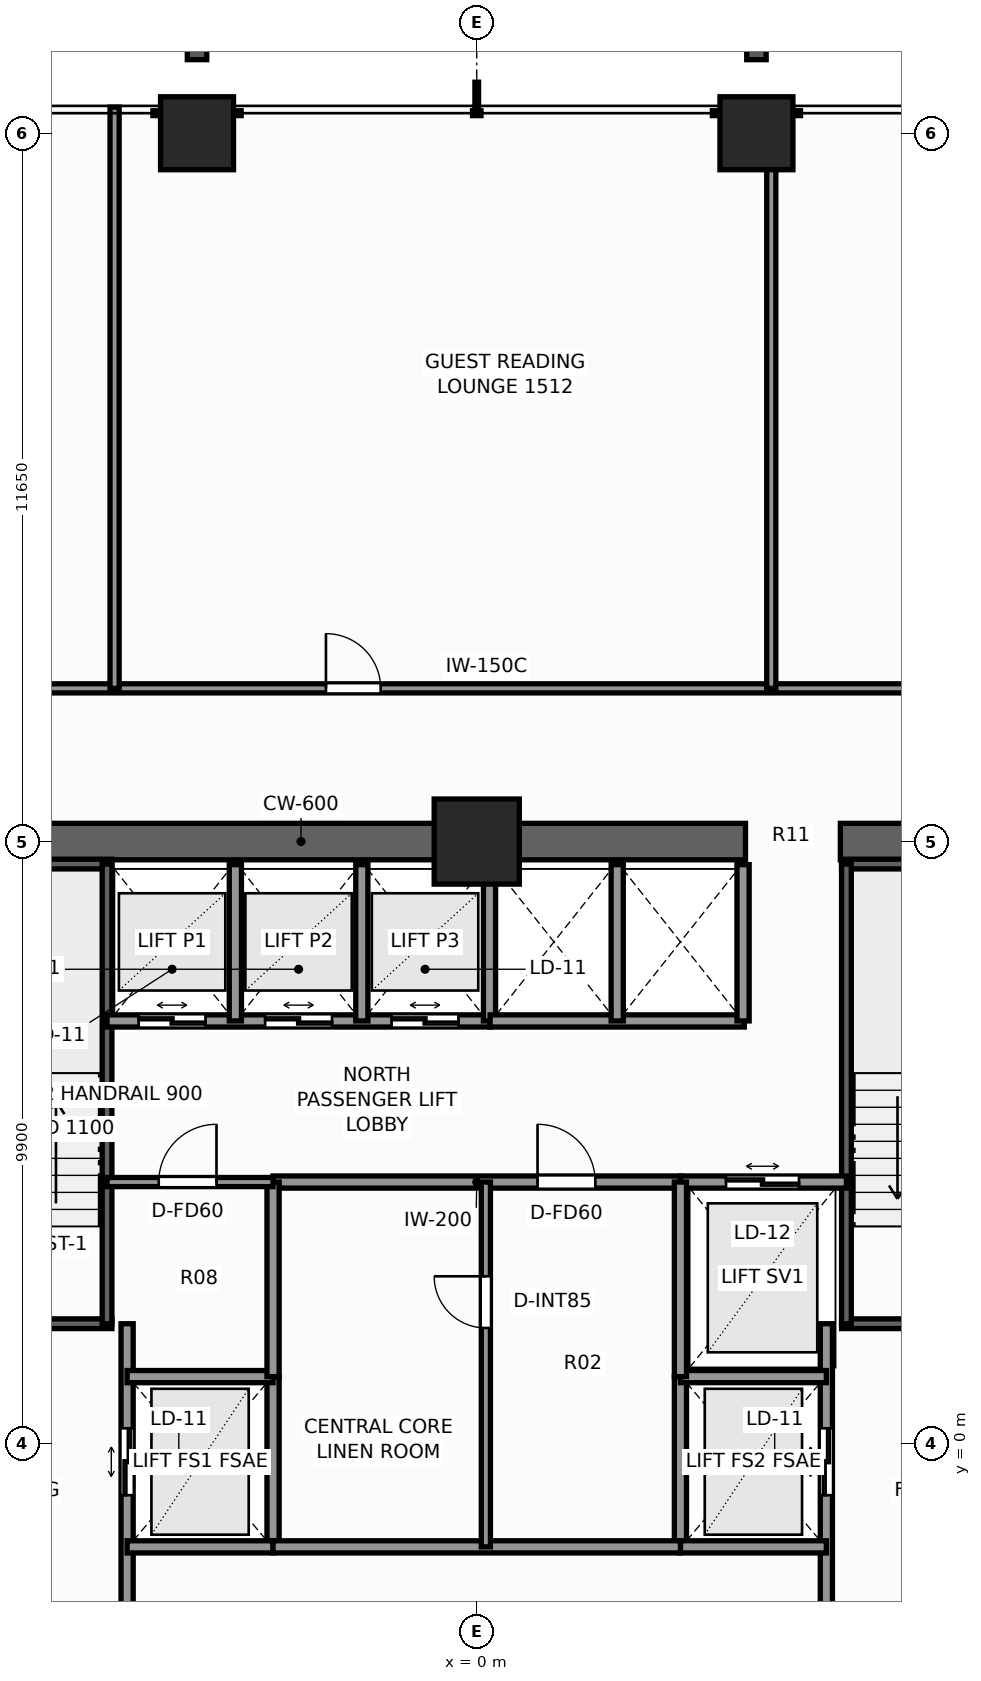
"""IFC4 building model, lengths in metres.
Left out: names, types, materials, properties, quantities, classifications, styles, units other than length and angle.
Written with IfcOpenShell. Run it as: python <this file> out.ifc"""

import sys

from ifc_helpers import new_model, si_unit, direction, frame, frame_2d, origin, origin_2d, place, context, subcontext, project, spatial, rectangle, extrude, element, fill, save


model = new_model("IFC4")
c1 = context("Model", 3, precision=1e-05, world=origin(), true_north=direction((0.0, 1.0)))
c2 = subcontext(c1, "Body", "Model", "MODEL_VIEW")
j1 = project(units=[si_unit("LENGTHUNIT", "METRE"), si_unit("PLANEANGLEUNIT", "RADIAN")], contexts=[c1])
p1 = place(None, origin())
s1 = spatial("IfcSite", under=j1, at=p1, CompositionType="ELEMENT")
p2 = place(p1, origin())
s2 = spatial("IfcBuilding", under=s1, at=p2, CompositionType="ELEMENT")
p3 = place(p2, frame((0.0, 0.0, 53.5)))
s3 = spatial("IfcBuildingStorey", under=s2, at=p3, CompositionType="ELEMENT", Elevation=53.5)
p4 = place(p3, frame((-10.2, 9.9, 0.0), z_axis=(0.0, 0.0, 1.0), x_axis=(1.0, 0.0, 0.0)))
e1 = element("IfcWall", 1, at=p4, inside=s3, PredefinedType="SHEAR", context=c2, shape_type="SweptSolid", body=[
    extrude(rectangle(XDim=14.62, YDim=0.6, at=frame_2d((7.31, 0.0))), origin(), (0.0, 0.0, 1.0), 3.3),
])
p5 = place(p3, frame((5.98, 9.9, 0.0), z_axis=(0.0, 0.0, 1.0), x_axis=(1.0, 0.0, 0.0)))
e2 = element("IfcWall", 2, at=p5, inside=s3, PredefinedType="SHEAR", context=c2, shape_type="SweptSolid", body=[
    extrude(rectangle(XDim=4.22, YDim=0.6, at=frame_2d((2.11, 0.0))), origin(), (0.0, 0.0, 1.0), 3.3),
])
p6 = place(p3, frame((0.0, 9.9, 0.0), z_axis=(0.0, 0.0, 1.0), x_axis=(1.0, 0.0, 0.0)))
e3 = element("IfcColumn", 3, at=p6, inside=s3, PredefinedType="COLUMN", context=c2, shape_type="SweptSolid", body=[
    extrude(rectangle(XDim=1.4, YDim=1.4, at=origin_2d()), origin(), (0.0, 0.0, 1.0), 3.3),
])
for number, where, z_axis, x_axis in (
    (4, (-4.6, 21.55, 0.0), (0.0, 0.0, 1.0), (1.0, 0.0, 0.0)),
    (5, (4.6, 21.55, 0.0), (0.0, 0.0, 1.0), (1.0, 0.0, 0.0)),
):
    element("IfcColumn", number, at=place(p3, frame(where, z_axis=z_axis, x_axis=x_axis)), inside=s3, PredefinedType="COLUMN", context=c2, shape_type="SweptSolid", body=[
        extrude(rectangle(XDim=1.2, YDim=1.2, at=origin_2d()), origin(), (0.0, 0.0, 1.0), 3.3),
    ])
p7 = place(p3, frame((-9.52, 1.97, 0.0), z_axis=(0.0, 0.0, 1.0), x_axis=(1.0, 0.0, 0.0)))
e6 = element("IfcWall", 6, at=p7, inside=s3, PredefinedType="SHEAR", context=c2, shape_type="SweptSolid", body=[
    extrude(rectangle(XDim=3.52, YDim=0.16, at=frame_2d((1.76, 0.0))), origin(), (0.0, 0.0, 1.0), 3.3),
])
p8 = place(p7, frame((1.15, 0.0, 0.0)))
e7 = element("IfcOpeningElement", 7, at=p8, cuts=e6, PredefinedType="OPENING", context=c2, shape_type="SweptSolid", body=[
    extrude(rectangle(XDim=1.1, YDim=2.2, at=frame_2d((0.55, 1.1))), frame((0.0, 0.09, 0.0), z_axis=(0.0, -1.0, 0.0), x_axis=(1.0, 0.0, 0.0)), (0.0, 0.0, 1.0), 0.18),
])
p9 = place(p3, frame((-9.52, 9.53, 0.0), z_axis=(0.0, 0.0, 1.0), x_axis=(1.0, 0.0, 0.0)))
e8 = element("IfcWall", 8, at=p9, inside=s3, PredefinedType="SHEAR", context=c2, shape_type="SweptSolid", body=[
    extrude(rectangle(XDim=3.52, YDim=0.16, at=frame_2d((1.76, 0.0))), origin(), (0.0, 0.0, 1.0), 3.3),
])
p10 = place(p3, frame((-6.08, 1.97, 0.0), z_axis=(0.0, 0.0, 1.0), x_axis=(0.0, 1.0, 0.0)))
e9 = element("IfcWall", 9, at=p10, inside=s3, PredefinedType="SHEAR", context=c2, shape_type="SweptSolid", body=[
    extrude(rectangle(XDim=7.56, YDim=0.16, at=frame_2d((3.78, 0.0))), origin(), (0.0, 0.0, 1.0), 3.3),
])
p11 = place(p3, frame((6.0, 1.97, 0.0), z_axis=(0.0, 0.0, 1.0), x_axis=(1.0, 0.0, 0.0)))
e10 = element("IfcWall", 10, at=p11, inside=s3, PredefinedType="SHEAR", context=c2, shape_type="SweptSolid", body=[
    extrude(rectangle(XDim=3.52, YDim=0.16, at=frame_2d((1.76, 0.0))), origin(), (0.0, 0.0, 1.0), 3.3),
])
p12 = place(p11, frame((1.15, 0.0, 0.0)))
e11 = element("IfcOpeningElement", 11, at=p12, cuts=e10, PredefinedType="OPENING", context=c2, shape_type="SweptSolid", body=[
    extrude(rectangle(XDim=1.1, YDim=2.2, at=frame_2d((0.55, 1.1))), frame((0.0, 0.09, 0.0), z_axis=(0.0, -1.0, 0.0), x_axis=(1.0, 0.0, 0.0)), (0.0, 0.0, 1.0), 0.18),
])
p13 = place(p3, frame((6.0, 9.53, 0.0), z_axis=(0.0, 0.0, 1.0), x_axis=(1.0, 0.0, 0.0)))
e12 = element("IfcWall", 12, at=p13, inside=s3, PredefinedType="SHEAR", context=c2, shape_type="SweptSolid", body=[
    extrude(rectangle(XDim=3.52, YDim=0.16, at=frame_2d((1.76, 0.0))), origin(), (0.0, 0.0, 1.0), 3.3),
])
p14 = place(p3, frame((6.08, 1.97, 0.0), z_axis=(0.0, 0.0, 1.0), x_axis=(0.0, 1.0, 0.0)))
e13 = element("IfcWall", 13, at=p14, inside=s3, PredefinedType="SHEAR", context=c2, shape_type="SweptSolid", body=[
    extrude(rectangle(XDim=7.56, YDim=0.16, at=frame_2d((3.78, 0.0))), origin(), (0.0, 0.0, 1.0), 3.3),
])
p15 = place(p3, frame((-5.75, -3.6, 0.0), z_axis=(0.0, 0.0, 1.0), x_axis=(0.0, 1.0, 0.0)))
e14 = element("IfcWall", 14, at=p15, inside=s3, PredefinedType="SOLIDWALL", context=c2, shape_type="SweptSolid", body=[
    extrude(rectangle(XDim=5.57, YDim=0.2, at=frame_2d((2.785, 0.0))), origin(), (0.0, 0.0, 1.0), 3.06),
])
p16 = place(p15, frame((2.75, 0.0, 0.0)))
e15 = element("IfcOpeningElement", 15, at=p16, cuts=e14, PredefinedType="OPENING", context=c2, shape_type="SweptSolid", body=[
    extrude(rectangle(XDim=1.1, YDim=2.2, at=frame_2d((0.55, 1.1))), frame((0.0, 0.11, 0.0), z_axis=(0.0, -1.0, 0.0), x_axis=(1.0, 0.0, 0.0)), (0.0, 0.0, 1.0), 0.22),
])
p17 = place(p3, frame((-3.35, -1.7, 0.0), z_axis=(0.0, 0.0, 1.0), x_axis=(0.0, 1.0, 0.0)))
e16 = element("IfcWall", 16, at=p17, inside=s3, PredefinedType="SOLIDWALL", context=c2, shape_type="SweptSolid", body=[
    extrude(rectangle(XDim=2.8, YDim=0.2, at=frame_2d((1.4, 0.0))), origin(), (0.0, 0.0, 1.0), 3.06),
])
for number, where, z_axis, x_axis in (
    (17, (-5.75, -1.7, 0.0), (0.0, 0.0, 1.0), (1.0, 0.0, 0.0)),
    (18, (-5.75, 1.1, 0.0), (0.0, 0.0, 1.0), (1.0, 0.0, 0.0)),
):
    element("IfcWall", number, at=place(p3, frame(where, z_axis=z_axis, x_axis=x_axis)), inside=s3, PredefinedType="SOLIDWALL", context=c2, shape_type="SweptSolid", body=[
        extrude(rectangle(XDim=2.4, YDim=0.2, at=frame_2d((1.2, 0.0))), origin(), (0.0, 0.0, 1.0), 3.06),
    ])
p18 = place(p3, frame((5.75, -3.6, 0.0), z_axis=(0.0, 0.0, 1.0), x_axis=(0.0, 1.0, 0.0)))
e19 = element("IfcWall", 19, at=p18, inside=s3, PredefinedType="SOLIDWALL", context=c2, shape_type="SweptSolid", body=[
    extrude(rectangle(XDim=5.57, YDim=0.2, at=frame_2d((2.785, 0.0))), origin(), (0.0, 0.0, 1.0), 3.06),
])
p19 = place(p18, frame((2.75, 0.0, 0.0)))
e20 = element("IfcOpeningElement", 20, at=p19, cuts=e19, PredefinedType="OPENING", context=c2, shape_type="SweptSolid", body=[
    extrude(rectangle(XDim=1.1, YDim=2.2, at=frame_2d((0.55, 1.1))), frame((0.0, 0.11, 0.0), z_axis=(0.0, -1.0, 0.0), x_axis=(1.0, 0.0, 0.0)), (0.0, 0.0, 1.0), 0.22),
])
p20 = place(p3, frame((3.35, -1.7, 0.0), z_axis=(0.0, 0.0, 1.0), x_axis=(0.0, 1.0, 0.0)))
e21 = element("IfcWall", 21, at=p20, inside=s3, PredefinedType="SOLIDWALL", context=c2, shape_type="SweptSolid", body=[
    extrude(rectangle(XDim=2.8, YDim=0.2, at=frame_2d((1.4, 0.0))), origin(), (0.0, 0.0, 1.0), 3.06),
])
for number, where, z_axis, x_axis in (
    (22, (3.35, -1.7, 0.0), (0.0, 0.0, 1.0), (1.0, 0.0, 0.0)),
    (23, (3.35, 1.1, 0.0), (0.0, 0.0, 1.0), (1.0, 0.0, 0.0)),
):
    element("IfcWall", number, at=place(p3, frame(where, z_axis=z_axis, x_axis=x_axis)), inside=s3, PredefinedType="SOLIDWALL", context=c2, shape_type="SweptSolid", body=[
        extrude(rectangle(XDim=2.4, YDim=0.2, at=frame_2d((1.2, 0.0))), origin(), (0.0, 0.0, 1.0), 3.06),
    ])
p21 = place(p3, frame((3.35, 4.3, 0.0), z_axis=(0.0, 0.0, 1.0), x_axis=(1.0, 0.0, 0.0)))
e24 = element("IfcWall", 24, at=p21, inside=s3, PredefinedType="SOLIDWALL", context=c2, shape_type="SweptSolid", body=[
    extrude(rectangle(XDim=2.73, YDim=0.2, at=frame_2d((1.365, 0.0))), origin(), (0.0, 0.0, 1.0), 3.06),
])
p22 = place(p21, frame((0.75, 0.0, 0.0)))
e25 = element("IfcOpeningElement", 25, at=p22, cuts=e24, PredefinedType="OPENING", context=c2, shape_type="SweptSolid", body=[
    extrude(rectangle(XDim=1.2, YDim=2.25, at=frame_2d((0.6, 1.125))), frame((0.0, 0.11, 0.0), z_axis=(0.0, -1.0, 0.0), x_axis=(1.0, 0.0, 0.0)), (0.0, 0.0, 1.0), 0.22),
])
p23 = place(p3, frame((-6.08, 6.95, 0.0), z_axis=(0.0, 0.0, 1.0), x_axis=(1.0, 0.0, 0.0)))
e26 = element("IfcWall", 26, at=p23, inside=s3, PredefinedType="SOLIDWALL", context=c2, shape_type="SweptSolid", body=[
    extrude(rectangle(XDim=6.3, YDim=0.2, at=frame_2d((3.15, 0.0))), origin(), (0.0, 0.0, 1.0), 3.06),
])
p24 = place(p23, frame((0.52, 0.0, 0.0)))
e27 = element("IfcOpeningElement", 27, at=p24, cuts=e26, PredefinedType="OPENING", context=c2, shape_type="SweptSolid", body=[
    extrude(rectangle(XDim=1.1, YDim=2.2, at=frame_2d((0.55, 1.1))), frame((0.0, 0.11, 0.0), z_axis=(0.0, -1.0, 0.0), x_axis=(1.0, 0.0, 0.0)), (0.0, 0.0, 1.0), 0.22),
])
p25 = place(p23, frame((2.6, 0.0, 0.0)))
e28 = element("IfcOpeningElement", 28, at=p25, cuts=e26, PredefinedType="OPENING", context=c2, shape_type="SweptSolid", body=[
    extrude(rectangle(XDim=1.1, YDim=2.2, at=frame_2d((0.55, 1.1))), frame((0.0, 0.11, 0.0), z_axis=(0.0, -1.0, 0.0), x_axis=(1.0, 0.0, 0.0)), (0.0, 0.0, 1.0), 0.22),
])
p26 = place(p23, frame((4.68, 0.0, 0.0)))
e29 = element("IfcOpeningElement", 29, at=p26, cuts=e26, PredefinedType="OPENING", context=c2, shape_type="SweptSolid", body=[
    extrude(rectangle(XDim=1.1, YDim=2.2, at=frame_2d((0.55, 1.1))), frame((0.0, 0.11, 0.0), z_axis=(0.0, -1.0, 0.0), x_axis=(1.0, 0.0, 0.0)), (0.0, 0.0, 1.0), 0.22),
])
for number, where, z_axis, x_axis in (
    (30, (-3.97, 6.95, 0.0), (0.0, 0.0, 1.0), (0.0, 1.0, 0.0)),
    (31, (-1.89, 6.95, 0.0), (0.0, 0.0, 1.0), (0.0, 1.0, 0.0)),
    (32, (0.21, 6.95, 0.0), (0.0, 0.0, 1.0), (0.0, 1.0, 0.0)),
):
    element("IfcWall", number, at=place(p3, frame(where, z_axis=z_axis, x_axis=x_axis)), inside=s3, PredefinedType="SOLIDWALL", context=c2, shape_type="SweptSolid", body=[
        extrude(rectangle(XDim=2.57, YDim=0.2, at=frame_2d((1.285, 0.0))), origin(), (0.0, 0.0, 1.0), 3.06),
    ])
p27 = place(p3, frame((0.22, 6.95, 0.0), z_axis=(0.0, 0.0, 1.0), x_axis=(1.0, 0.0, 0.0)))
e33 = element("IfcWall", 33, at=p27, inside=s3, PredefinedType="SOLIDWALL", context=c2, shape_type="SweptSolid", body=[
    extrude(rectangle(XDim=4.18, YDim=0.2, at=frame_2d((2.09, 0.0))), origin(), (0.0, 0.0, 1.0), 3.06),
])
for number, where, z_axis, x_axis in (
    (34, (4.38, 6.95, 0.0), (0.0, 0.0, 1.0), (0.0, 1.0, 0.0)),
    (35, (2.31, 6.95, 0.0), (0.0, 0.0, 1.0), (0.0, 1.0, 0.0)),
):
    element("IfcWall", number, at=place(p3, frame(where, z_axis=z_axis, x_axis=x_axis)), inside=s3, PredefinedType="SOLIDWALL", context=c2, shape_type="SweptSolid", body=[
        extrude(rectangle(XDim=2.57, YDim=0.2, at=frame_2d((1.285, 0.0))), origin(), (0.0, 0.0, 1.0), 3.06),
    ])
p28 = place(p3, frame((-3.35, 4.3, 0.0), z_axis=(0.0, 0.0, 1.0), x_axis=(1.0, 0.0, 0.0)))
e36 = element("IfcWall", 36, at=p28, inside=s3, PredefinedType="SOLIDWALL", context=c2, shape_type="SweptSolid", body=[
    extrude(rectangle(XDim=6.7, YDim=0.2, at=frame_2d((3.35, 0.0))), origin(), (0.0, 0.0, 1.0), 3.06),
])
p29 = place(p28, frame((4.35, 0.0, 0.0)))
e37 = element("IfcOpeningElement", 37, at=p29, cuts=e36, PredefinedType="OPENING", context=c2, shape_type="SweptSolid", body=[
    extrude(rectangle(XDim=0.95, YDim=2.06, at=frame_2d((0.475, 1.03))), frame((0.0, 0.11, 0.0), z_axis=(0.0, -1.0, 0.0), x_axis=(1.0, 0.0, 0.0)), (0.0, 0.0, 1.0), 0.22),
])
p30 = place(p3, frame((-3.35, -1.7, 0.0), z_axis=(0.0, 0.0, 1.0), x_axis=(1.0, 0.0, 0.0)))
e38 = element("IfcWall", 38, at=p30, inside=s3, PredefinedType="SOLIDWALL", context=c2, shape_type="SweptSolid", body=[
    extrude(rectangle(XDim=6.7, YDim=0.2, at=frame_2d((3.35, 0.0))), origin(), (0.0, 0.0, 1.0), 3.06),
])
for number, where, z_axis, x_axis in (
    (39, (-3.35, 1.1, 0.0), (0.0, 0.0, 1.0), (0.0, 1.0, 0.0)),
    (40, (3.35, 1.1, 0.0), (0.0, 0.0, 1.0), (0.0, 1.0, 0.0)),
):
    element("IfcWall", number, at=place(p3, frame(where, z_axis=z_axis, x_axis=x_axis)), inside=s3, PredefinedType="SOLIDWALL", context=c2, shape_type="SweptSolid", body=[
        extrude(rectangle(XDim=3.2, YDim=0.2, at=frame_2d((1.6, 0.0))), origin(), (0.0, 0.0, 1.0), 3.06),
    ])
p31 = place(p3, frame((0.15, -1.7, 0.0), z_axis=(0.0, 0.0, 1.0), x_axis=(0.0, 1.0, 0.0)))
e41 = element("IfcWall", 41, at=p31, inside=s3, PredefinedType="PARTITIONING", context=c2, shape_type="SweptSolid", body=[
    extrude(rectangle(XDim=6.0, YDim=0.15, at=frame_2d((3.0, 0.0))), origin(), (0.0, 0.0, 1.0), 3.06),
])
p32 = place(p31, frame((3.6, 0.0, 0.0)))
e42 = element("IfcOpeningElement", 42, at=p32, cuts=e41, PredefinedType="OPENING", context=c2, shape_type="SweptSolid", body=[
    extrude(rectangle(XDim=0.85, YDim=2.03, at=frame_2d((0.425, 1.015))), frame((0.0, 0.085, 0.0), z_axis=(0.0, -1.0, 0.0), x_axis=(1.0, 0.0, 0.0)), (0.0, 0.0, 1.0), 0.17),
])
p33 = place(p3, frame((-6.08, 4.3, 0.0), z_axis=(0.0, 0.0, 1.0), x_axis=(1.0, 0.0, 0.0)))
e43 = element("IfcWall", 43, at=p33, inside=s3, PredefinedType="PARTITIONING", context=c2, shape_type="SweptSolid", body=[
    extrude(rectangle(XDim=2.73, YDim=0.15, at=frame_2d((1.365, 0.0))), origin(), (0.0, 0.0, 1.0), 3.06),
])
p34 = place(p33, frame((0.85, 0.0, 0.0)))
e44 = element("IfcOpeningElement", 44, at=p34, cuts=e43, PredefinedType="OPENING", context=c2, shape_type="SweptSolid", body=[
    extrude(rectangle(XDim=0.95, YDim=2.06, at=frame_2d((0.475, 1.03))), frame((0.0, 0.085, 0.0), z_axis=(0.0, -1.0, 0.0), x_axis=(1.0, 0.0, 0.0)), (0.0, 0.0, 1.0), 0.17),
])
p35 = place(p3, frame((-12.26, 12.42, 0.0), z_axis=(0.0, 0.0, 1.0), x_axis=(1.0, 0.0, 0.0)))
e45 = element("IfcWall", 45, at=p35, inside=s3, PredefinedType="PARTITIONING", context=c2, shape_type="SweptSolid", body=[
    extrude(rectangle(XDim=24.84, YDim=0.15, at=frame_2d((12.42, 0.0))), origin(), (0.0, 0.0, 1.0), 2.272),
])
p36 = place(p35, frame((3.979, 0.0, 0.0)))
e46 = element("IfcOpeningElement", 46, at=p36, cuts=e45, PredefinedType="OPENING", context=c2, shape_type="SweptSolid", body=[
    extrude(rectangle(XDim=0.9, YDim=2.06, at=frame_2d((0.45, 1.03))), frame((0.0, 0.085, 0.0), z_axis=(0.0, -1.0, 0.0), x_axis=(1.0, 0.0, 0.0)), (0.0, 0.0, 1.0), 0.17),
])
p37 = place(p35, frame((9.78, 0.0, 0.0)))
e47 = element("IfcOpeningElement", 47, at=p37, cuts=e45, PredefinedType="OPENING", context=c2, shape_type="SweptSolid", body=[
    extrude(rectangle(XDim=0.9, YDim=2.06, at=frame_2d((0.45, 1.03))), frame((0.0, 0.085, 0.0), z_axis=(0.0, -1.0, 0.0), x_axis=(1.0, 0.0, 0.0)), (0.0, 0.0, 1.0), 0.17),
])
p38 = place(p35, frame((19.345, 0.0, 0.0)))
e48 = element("IfcOpeningElement", 48, at=p38, cuts=e45, PredefinedType="OPENING", context=c2, shape_type="SweptSolid", body=[
    extrude(rectangle(XDim=0.9, YDim=2.06, at=frame_2d((0.45, 1.03))), frame((0.0, 0.085, 0.0), z_axis=(0.0, -1.0, 0.0), x_axis=(1.0, 0.0, 0.0)), (0.0, 0.0, 1.0), 0.17),
])
p39 = place(p3, frame((-5.956, 12.42, 0.0), z_axis=(0.0, 0.0, 1.0), x_axis=(0.0, 1.0, 0.0)))
e49 = element("IfcWall", 49, at=p39, inside=s3, PredefinedType="PARTITIONING", context=c2, shape_type="SweptSolid", body=[
    extrude(rectangle(XDim=9.56, YDim=0.15, at=frame_2d((4.78, 0.0))), origin(), (0.0, 0.0, 1.0), 2.429),
])
p40 = place(p3, frame((4.844, 12.42, 0.0), z_axis=(0.0, 0.0, 1.0), x_axis=(0.0, 1.0, 0.0)))
e50 = element("IfcWall", 50, at=p40, inside=s3, PredefinedType="PARTITIONING", context=c2, shape_type="SweptSolid", body=[
    extrude(rectangle(XDim=9.56, YDim=0.15, at=frame_2d((4.78, 0.0))), origin(), (0.0, 0.0, 1.0), 2.272),
])
p41 = place(p16, origin())
e51 = element("IfcDoor", 51, at=p41, inside=s3, OperationType="DOUBLE_DOOR_SLIDING", PredefinedType="DOOR", context=c2, shape_type="SweptSolid", body=[
    extrude(rectangle(XDim=1.1, YDim=2.2, at=frame_2d((0.55, 1.1))), frame((0.0, 0.025, 0.0), z_axis=(0.0, -1.0, 0.0), x_axis=(1.0, 0.0, 0.0)), (0.0, 0.0, 1.0), 0.05),
])
fill(e15, e51)
p42 = place(p19, origin())
e52 = element("IfcDoor", 52, at=p42, inside=s3, OperationType="DOUBLE_DOOR_SLIDING", PredefinedType="DOOR", context=c2, shape_type="SweptSolid", body=[
    extrude(rectangle(XDim=1.1, YDim=2.2, at=frame_2d((0.55, 1.1))), frame((0.0, 0.025, 0.0), z_axis=(0.0, -1.0, 0.0), x_axis=(1.0, 0.0, 0.0)), (0.0, 0.0, 1.0), 0.05),
])
fill(e20, e52)
p43 = place(p22, origin())
e53 = element("IfcDoor", 53, at=p43, inside=s3, OperationType="DOUBLE_DOOR_SLIDING", PredefinedType="DOOR", context=c2, shape_type="SweptSolid", body=[
    extrude(rectangle(XDim=1.2, YDim=2.25, at=frame_2d((0.6, 1.125))), frame((0.0, 0.025, 0.0), z_axis=(0.0, -1.0, 0.0), x_axis=(1.0, 0.0, 0.0)), (0.0, 0.0, 1.0), 0.05),
])
fill(e25, e53)
p44 = place(p24, origin())
e54 = element("IfcDoor", 54, at=p44, inside=s3, OperationType="DOUBLE_DOOR_SLIDING", PredefinedType="DOOR", context=c2, shape_type="SweptSolid", body=[
    extrude(rectangle(XDim=1.1, YDim=2.2, at=frame_2d((0.55, 1.1))), frame((0.0, 0.025, 0.0), z_axis=(0.0, -1.0, 0.0), x_axis=(1.0, 0.0, 0.0)), (0.0, 0.0, 1.0), 0.05),
])
fill(e27, e54)
p45 = place(p25, origin())
e55 = element("IfcDoor", 55, at=p45, inside=s3, OperationType="DOUBLE_DOOR_SLIDING", PredefinedType="DOOR", context=c2, shape_type="SweptSolid", body=[
    extrude(rectangle(XDim=1.1, YDim=2.2, at=frame_2d((0.55, 1.1))), frame((0.0, 0.025, 0.0), z_axis=(0.0, -1.0, 0.0), x_axis=(1.0, 0.0, 0.0)), (0.0, 0.0, 1.0), 0.05),
])
fill(e28, e55)
p46 = place(p26, origin())
e56 = element("IfcDoor", 56, at=p46, inside=s3, OperationType="DOUBLE_DOOR_SLIDING", PredefinedType="DOOR", context=c2, shape_type="SweptSolid", body=[
    extrude(rectangle(XDim=1.1, YDim=2.2, at=frame_2d((0.55, 1.1))), frame((0.0, 0.025, 0.0), z_axis=(0.0, -1.0, 0.0), x_axis=(1.0, 0.0, 0.0)), (0.0, 0.0, 1.0), 0.05),
])
fill(e29, e56)
p47 = place(p29, origin())
e57 = element("IfcDoor", 57, at=p47, inside=s3, OperationType="SINGLE_SWING_LEFT", PredefinedType="DOOR", context=c2, shape_type="SweptSolid", body=[
    extrude(rectangle(XDim=0.95, YDim=2.06, at=frame_2d((0.475, 1.03))), frame((0.0, 0.025, 0.0), z_axis=(0.0, -1.0, 0.0), x_axis=(1.0, 0.0, 0.0)), (0.0, 0.0, 1.0), 0.05),
])
fill(e37, e57)
p48 = place(p32, origin())
e58 = element("IfcDoor", 58, at=p48, inside=s3, OperationType="SINGLE_SWING_RIGHT", PredefinedType="DOOR", context=c2, shape_type="SweptSolid", body=[
    extrude(rectangle(XDim=0.85, YDim=2.03, at=frame_2d((0.425, 1.015))), frame((0.0, 0.025, 0.0), z_axis=(0.0, -1.0, 0.0), x_axis=(1.0, 0.0, 0.0)), (0.0, 0.0, 1.0), 0.05),
])
fill(e42, e58)
p49 = place(p34, origin())
e59 = element("IfcDoor", 59, at=p49, inside=s3, OperationType="SINGLE_SWING_RIGHT", PredefinedType="DOOR", context=c2, shape_type="SweptSolid", body=[
    extrude(rectangle(XDim=0.95, YDim=2.06, at=frame_2d((0.475, 1.03))), frame((0.0, 0.025, 0.0), z_axis=(0.0, -1.0, 0.0), x_axis=(1.0, 0.0, 0.0)), (0.0, 0.0, 1.0), 0.05),
])
fill(e44, e59)
p50 = place(p37, origin())
e60 = element("IfcDoor", 60, at=p50, inside=s3, OperationType="SINGLE_SWING_LEFT", PredefinedType="DOOR", context=c2, shape_type="SweptSolid", body=[
    extrude(rectangle(XDim=0.9, YDim=2.06, at=frame_2d((0.45, 1.03))), frame((0.0, 0.025, 0.0), z_axis=(0.0, -1.0, 0.0), x_axis=(1.0, 0.0, 0.0)), (0.0, 0.0, 1.0), 0.05),
])
fill(e47, e60)
save(model, sys.argv[1])
